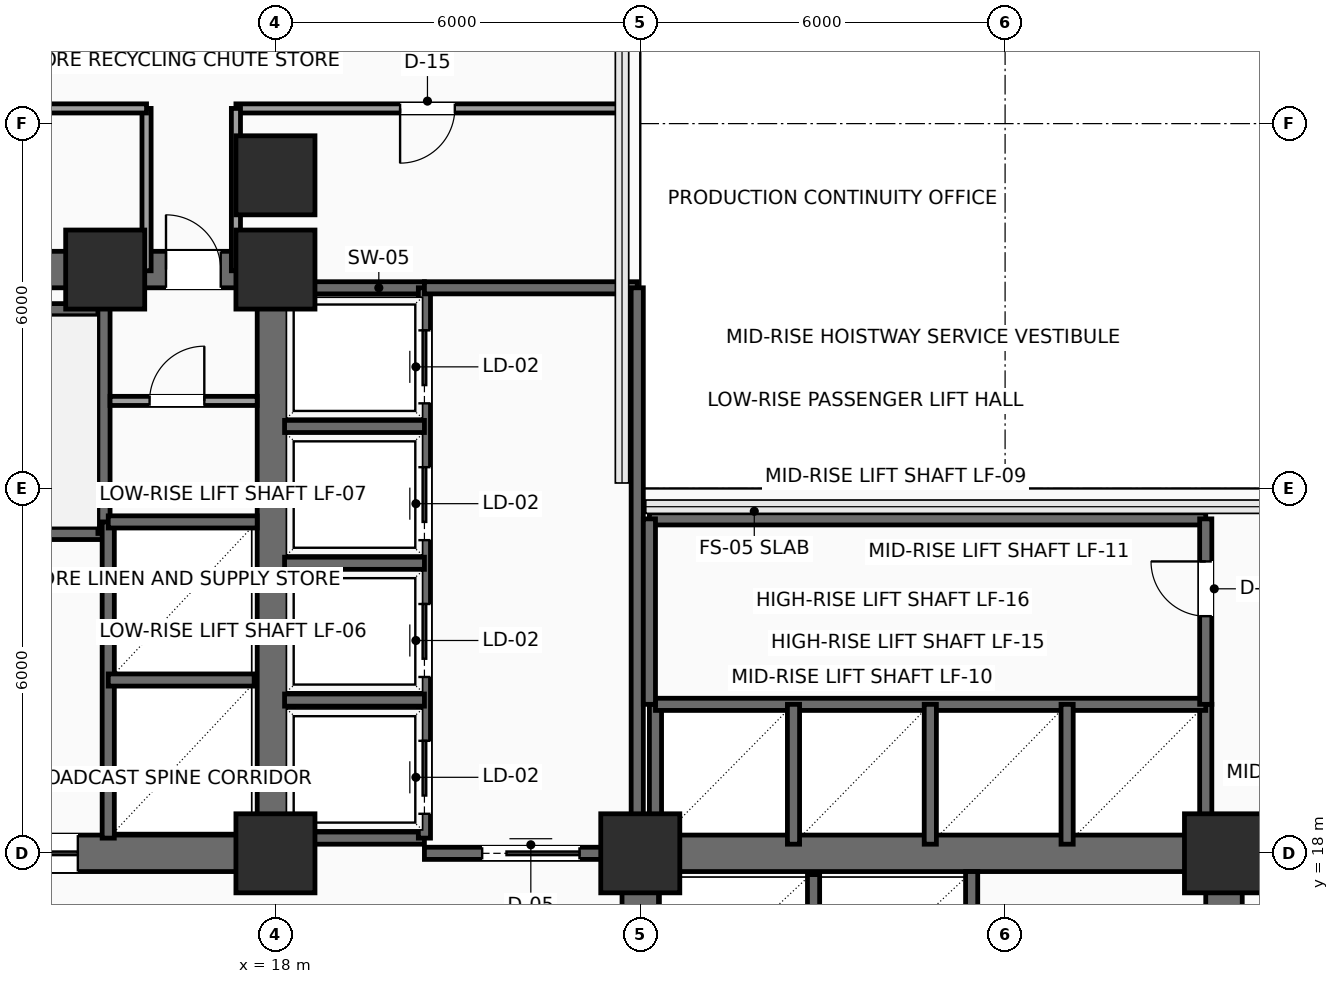
"""IFC4 building model, lengths in metres.
Left out: names, types, materials, properties, quantities, classifications, styles, units other than length and angle.
Written with IfcOpenShell. Run it as: python <this file> out.ifc"""

import sys

from ifc_helpers import new_model, si_unit, direction, frame, frame_2d, origin, origin_2d, place, context, subcontext, project, spatial, rectangle, extrude, element, fill, save


model = new_model("IFC4")
c1 = context("Model", 3, precision=1e-05, world=origin(), true_north=direction((0.0, 1.0)))
c2 = subcontext(c1, "Body", "Model", "MODEL_VIEW")
j1 = project(units=[si_unit("LENGTHUNIT", "METRE"), si_unit("PLANEANGLEUNIT", "RADIAN")], contexts=[c1])
p1 = place(None, origin())
s1 = spatial("IfcSite", under=j1, at=p1, CompositionType="ELEMENT")
p2 = place(p1, origin())
s2 = spatial("IfcBuilding", under=s1, at=p2, CompositionType="ELEMENT")
p3 = place(p2, frame((0.0, 0.0, 32.4)))
s3 = spatial("IfcBuildingStorey", under=s2, at=p3, CompositionType="ELEMENT", Elevation=32.4)
for number, where, z_axis, x_axis in (
    (1, (18.0, 18.0, 0.0), (0.0, 0.0, 1.0), (1.0, 0.0, 0.0)),
    (2, (15.2, 27.6, 0.0), (0.0, 0.0, 1.0), (1.0, 0.0, 0.0)),
    (3, (18.0, 27.6, 0.0), (0.0, 0.0, 1.0), (1.0, 0.0, 0.0)),
    (4, (24.0, 18.0, 0.0), (0.0, 0.0, 1.0), (1.0, 0.0, 0.0)),
    (5, (33.6, 18.0, 0.0), (0.0, 0.0, 1.0), (1.0, 0.0, 0.0)),
    (6, (18.0, 29.15, 0.0), (0.0, 0.0, 1.0), (1.0, 0.0, 0.0)),
):
    element("IfcColumn", number, at=place(p3, frame(where, z_axis=z_axis, x_axis=x_axis)), inside=s3, PredefinedType="COLUMN", context=c2, shape_type="SweptSolid", body=[
        extrude(rectangle(XDim=1.3, YDim=1.3, at=origin_2d()), origin(), (0.0, 0.0, 1.0), 3.9),
    ])
p4 = place(p3, frame((6.0, 18.0, 0.0), z_axis=(0.0, 0.0, 1.0), x_axis=(1.0, 0.0, 0.0)))
e7 = element("IfcWall", 7, at=p4, inside=s3, PredefinedType="SHEAR", context=c2, shape_type="SweptSolid", body=[
    extrude(rectangle(XDim=12.0, YDim=0.6, at=frame_2d((6.0, 0.0))), origin(), (0.0, 0.0, 1.0), 3.65),
])
p5 = place(p4, frame((7.15, 0.0, 0.0)))
e8 = element("IfcOpeningElement", 8, at=p5, cuts=e7, PredefinedType="OPENING", context=c2, shape_type="SweptSolid", body=[
    extrude(rectangle(XDim=1.6, YDim=2.3, at=frame_2d((0.8, 1.15))), frame((0.0, 0.31, 0.0), z_axis=(0.0, -1.0, 0.0), x_axis=(1.0, 0.0, 0.0)), (0.0, 0.0, 1.0), 0.62),
])
p6 = place(p3, frame((6.0, 27.6, 0.0), z_axis=(0.0, 0.0, 1.0), x_axis=(1.0, 0.0, 0.0)))
e9 = element("IfcWall", 9, at=p6, inside=s3, PredefinedType="SHEAR", context=c2, shape_type="SweptSolid", body=[
    extrude(rectangle(XDim=12.0, YDim=0.6, at=frame_2d((6.0, 0.0))), origin(), (0.0, 0.0, 1.0), 3.65),
])
p7 = place(p6, frame((10.2, 0.0, 0.0)))
e10 = element("IfcOpeningElement", 10, at=p7, cuts=e9, PredefinedType="OPENING", context=c2, shape_type="SweptSolid", body=[
    extrude(rectangle(XDim=0.9, YDim=2.15, at=frame_2d((0.45, 1.075))), frame((0.0, 0.31, 0.0), z_axis=(0.0, -1.0, 0.0), x_axis=(1.0, 0.0, 0.0)), (0.0, 0.0, 1.0), 0.62),
])
for number, where, z_axis, x_axis in (
    (11, (18.0, 18.0, 0.0), (0.0, 0.0, 1.0), (0.0, 1.0, 0.0)),
    (12, (24.0, 18.0, 0.0), (0.0, 0.0, 1.0), (1.0, 0.0, 0.0)),
):
    element("IfcWall", number, at=place(p3, frame(where, z_axis=z_axis, x_axis=x_axis)), inside=s3, PredefinedType="SHEAR", context=c2, shape_type="SweptSolid", body=[
        extrude(rectangle(XDim=9.6, YDim=0.6, at=frame_2d((4.8, 0.0))), origin(), (0.0, 0.0, 1.0), 3.65),
    ])
p8 = place(p3, frame((24.0, 6.0, 0.0), z_axis=(0.0, 0.0, 1.0), x_axis=(0.0, 1.0, 0.0)))
e13 = element("IfcWall", 13, at=p8, inside=s3, PredefinedType="SHEAR", context=c2, shape_type="SweptSolid", body=[
    extrude(rectangle(XDim=12.0, YDim=0.6, at=frame_2d((6.0, 0.0))), origin(), (0.0, 0.0, 1.0), 3.65),
])
p9 = place(p8, frame((7.15, 0.0, 0.0)))
e14 = element("IfcOpeningElement", 14, at=p9, cuts=e13, PredefinedType="OPENING", context=c2, shape_type="SweptSolid", body=[
    extrude(rectangle(XDim=1.6, YDim=2.3, at=frame_2d((0.8, 1.15))), frame((0.0, 0.31, 0.0), z_axis=(0.0, -1.0, 0.0), x_axis=(1.0, 0.0, 0.0)), (0.0, 0.0, 1.0), 0.62),
])
p10 = place(p3, frame((33.6, 6.0, 0.0), z_axis=(0.0, 0.0, 1.0), x_axis=(0.0, 1.0, 0.0)))
e15 = element("IfcWall", 15, at=p10, inside=s3, PredefinedType="SHEAR", context=c2, shape_type="SweptSolid", body=[
    extrude(rectangle(XDim=12.0, YDim=0.6, at=frame_2d((6.0, 0.0))), origin(), (0.0, 0.0, 1.0), 3.65),
])
p11 = place(p10, frame((10.2, 0.0, 0.0)))
e16 = element("IfcOpeningElement", 16, at=p11, cuts=e15, PredefinedType="OPENING", context=c2, shape_type="SweptSolid", body=[
    extrude(rectangle(XDim=0.9, YDim=2.15, at=frame_2d((0.45, 1.075))), frame((0.0, 0.31, 0.0), z_axis=(0.0, -1.0, 0.0), x_axis=(1.0, 0.0, 0.0)), (0.0, 0.0, 1.0), 0.62),
])
p12 = place(p3, frame((6.3, 23.26, 0.0), z_axis=(0.0, 0.0, 1.0), x_axis=(1.0, 0.0, 0.0)))
e17 = element("IfcWall", 17, at=p12, inside=s3, PredefinedType="SHEAR", context=c2, shape_type="SweptSolid", body=[
    extrude(rectangle(XDim=8.88, YDim=0.2, at=frame_2d((4.44, 0.0))), origin(), (0.0, 0.0, 1.0), 3.65),
])
p13 = place(p12, frame((0.35, 0.0, 0.0)))
e18 = element("IfcOpeningElement", 18, at=p13, cuts=e17, PredefinedType="OPENING", context=c2, shape_type="SweptSolid", body=[
    extrude(rectangle(XDim=1.1, YDim=2.2, at=frame_2d((0.55, 1.1))), frame((0.0, 0.11, 0.0), z_axis=(0.0, -1.0, 0.0), x_axis=(1.0, 0.0, 0.0)), (0.0, 0.0, 1.0), 0.22),
])
p14 = place(p3, frame((6.3, 26.94, 0.0), z_axis=(0.0, 0.0, 1.0), x_axis=(1.0, 0.0, 0.0)))
e19 = element("IfcWall", 19, at=p14, inside=s3, PredefinedType="SHEAR", context=c2, shape_type="SweptSolid", body=[
    extrude(rectangle(XDim=8.88, YDim=0.2, at=frame_2d((4.44, 0.0))), origin(), (0.0, 0.0, 1.0), 3.65),
])
p15 = place(p3, frame((15.18, 23.26, 0.0), z_axis=(0.0, 0.0, 1.0), x_axis=(0.0, 1.0, 0.0)))
e20 = element("IfcWall", 20, at=p15, inside=s3, PredefinedType="SHEAR", context=c2, shape_type="SweptSolid", body=[
    extrude(rectangle(XDim=4.04, YDim=0.2, at=frame_2d((2.02, 0.0))), origin(), (0.0, 0.0, 1.0), 3.65),
])
p16 = place(p3, frame((15.25, 18.25, 0.0), z_axis=(0.0, 0.0, 1.0), x_axis=(0.0, 1.0, 0.0)))
e21 = element("IfcWall", 21, at=p16, inside=s3, PredefinedType="SHEAR", context=c2, shape_type="SweptSolid", body=[
    extrude(rectangle(XDim=5.2, YDim=0.2, at=frame_2d((2.6, 0.0))), origin(), (0.0, 0.0, 1.0), 3.65),
])
p17 = place(p3, frame((15.25, 20.85, 0.0), z_axis=(0.0, 0.0, 1.0), x_axis=(1.0, 0.0, 0.0)))
e22 = element("IfcWall", 22, at=p17, inside=s3, PredefinedType="SHEAR", context=c2, shape_type="SweptSolid", body=[
    extrude(rectangle(XDim=2.4, YDim=0.2, at=frame_2d((1.2, 0.0))), origin(), (0.0, 0.0, 1.0), 3.65),
])
p18 = place(p3, frame((15.25, 23.45, 0.0), z_axis=(0.0, 0.0, 1.0), x_axis=(1.0, 0.0, 0.0)))
e23 = element("IfcWall", 23, at=p18, inside=s3, PredefinedType="SHEAR", context=c2, shape_type="SweptSolid", body=[
    extrude(rectangle(XDim=2.45, YDim=0.2, at=frame_2d((1.225, 0.0))), origin(), (0.0, 0.0, 1.0), 3.65),
])
p19 = place(p3, frame((26.85, 15.25, 0.0), z_axis=(0.0, 0.0, 1.0), x_axis=(0.0, 1.0, 0.0)))
e24 = element("IfcWall", 24, at=p19, inside=s3, PredefinedType="SHEAR", context=c2, shape_type="SweptSolid", body=[
    extrude(rectangle(XDim=2.4, YDim=0.2, at=frame_2d((1.2, 0.0))), origin(), (0.0, 0.0, 1.0), 3.65),
])
p20 = place(p3, frame((29.45, 15.25, 0.0), z_axis=(0.0, 0.0, 1.0), x_axis=(0.0, 1.0, 0.0)))
e25 = element("IfcWall", 25, at=p20, inside=s3, PredefinedType="SHEAR", context=c2, shape_type="SweptSolid", body=[
    extrude(rectangle(XDim=2.45, YDim=0.2, at=frame_2d((1.225, 0.0))), origin(), (0.0, 0.0, 1.0), 3.65),
])
p21 = place(p3, frame((15.28, 25.44, 0.0), z_axis=(0.0, 0.0, 1.0), x_axis=(1.0, 0.0, 0.0)))
e26 = element("IfcWall", 26, at=p21, inside=s3, PredefinedType="PARTITIONING", context=c2, shape_type="SweptSolid", body=[
    extrude(rectangle(XDim=2.42, YDim=0.15, at=frame_2d((1.21, 0.0))), origin(), (0.0, 0.0, 1.0), 3.65),
])
p22 = place(p21, frame((0.65, 0.0, 0.0)))
e27 = element("IfcOpeningElement", 27, at=p22, cuts=e26, PredefinedType="OPENING", context=c2, shape_type="SweptSolid", body=[
    extrude(rectangle(XDim=0.9, YDim=2.15, at=frame_2d((0.45, 1.075))), frame((0.0, 0.085, 0.0), z_axis=(0.0, -1.0, 0.0), x_axis=(1.0, 0.0, 0.0)), (0.0, 0.0, 1.0), 0.17),
])
for number, where, z_axis, x_axis in (
    (28, (18.1, 27.3, 0.0), (0.0, 0.0, 1.0), (1.0, 0.0, 0.0)),
    (29, (18.1, 18.25, 0.0), (0.0, 0.0, 1.0), (1.0, 0.0, 0.0)),
):
    element("IfcWall", number, at=place(p3, frame(where, z_axis=z_axis, x_axis=x_axis)), inside=s3, PredefinedType="SHEAR", context=c2, shape_type="SweptSolid", body=[
        extrude(rectangle(XDim=2.35, YDim=0.2, at=frame_2d((1.175, 0.0))), origin(), (0.0, 0.0, 1.0), 3.65),
    ])
p23 = place(p3, frame((20.45, 18.25, 0.0), z_axis=(0.0, 0.0, 1.0), x_axis=(0.0, 1.0, 0.0)))
e30 = element("IfcWall", 30, at=p23, inside=s3, PredefinedType="SHEAR", context=c2, shape_type="SweptSolid", body=[
    extrude(rectangle(XDim=9.05, YDim=0.2, at=frame_2d((4.525, 0.0))), origin(), (0.0, 0.0, 1.0), 3.65),
])
p24 = place(p23, frame((0.4, 0.0, 0.0)))
e31 = element("IfcOpeningElement", 31, at=p24, cuts=e30, PredefinedType="OPENING", context=c2, shape_type="SweptSolid", body=[
    extrude(rectangle(XDim=1.2, YDim=2.2, at=frame_2d((0.6, 1.1))), frame((0.0, 0.11, 0.0), z_axis=(0.0, -1.0, 0.0), x_axis=(1.0, 0.0, 0.0)), (0.0, 0.0, 1.0), 0.22),
])
p25 = place(p23, frame((2.65, 0.0, 0.0)))
e32 = element("IfcOpeningElement", 32, at=p25, cuts=e30, PredefinedType="OPENING", context=c2, shape_type="SweptSolid", body=[
    extrude(rectangle(XDim=1.2, YDim=2.2, at=frame_2d((0.6, 1.1))), frame((0.0, 0.11, 0.0), z_axis=(0.0, -1.0, 0.0), x_axis=(1.0, 0.0, 0.0)), (0.0, 0.0, 1.0), 0.22),
])
p26 = place(p23, frame((4.9, 0.0, 0.0)))
e33 = element("IfcOpeningElement", 33, at=p26, cuts=e30, PredefinedType="OPENING", context=c2, shape_type="SweptSolid", body=[
    extrude(rectangle(XDim=1.2, YDim=2.2, at=frame_2d((0.6, 1.1))), frame((0.0, 0.11, 0.0), z_axis=(0.0, -1.0, 0.0), x_axis=(1.0, 0.0, 0.0)), (0.0, 0.0, 1.0), 0.22),
])
p27 = place(p23, frame((7.15, 0.0, 0.0)))
e34 = element("IfcOpeningElement", 34, at=p27, cuts=e30, PredefinedType="OPENING", context=c2, shape_type="SweptSolid", body=[
    extrude(rectangle(XDim=1.2, YDim=2.2, at=frame_2d((0.6, 1.1))), frame((0.0, 0.11, 0.0), z_axis=(0.0, -1.0, 0.0), x_axis=(1.0, 0.0, 0.0)), (0.0, 0.0, 1.0), 0.22),
])
for number, where, z_axis, x_axis in (
    (35, (18.15, 20.52, 0.0), (0.0, 0.0, 1.0), (1.0, 0.0, 0.0)),
    (36, (18.15, 22.77, 0.0), (0.0, 0.0, 1.0), (1.0, 0.0, 0.0)),
    (37, (18.15, 25.02, 0.0), (0.0, 0.0, 1.0), (1.0, 0.0, 0.0)),
):
    element("IfcWall", number, at=place(p3, frame(where, z_axis=z_axis, x_axis=x_axis)), inside=s3, PredefinedType="SHEAR", context=c2, shape_type="SweptSolid", body=[
        extrude(rectangle(XDim=2.3, YDim=0.2, at=frame_2d((1.15, 0.0))), origin(), (0.0, 0.0, 1.0), 3.65),
    ])
p28 = place(p3, frame((20.45, 18.0, 0.0), z_axis=(0.0, 0.0, 1.0), x_axis=(1.0, 0.0, 0.0)))
e38 = element("IfcWall", 38, at=p28, inside=s3, PredefinedType="SHEAR", context=c2, shape_type="SweptSolid", body=[
    extrude(rectangle(XDim=3.5, YDim=0.2, at=frame_2d((1.75, 0.0))), origin(), (0.0, 0.0, 1.0), 3.65),
])
p29 = place(p28, frame((0.95, 0.0, 0.0)))
e39 = element("IfcOpeningElement", 39, at=p29, cuts=e38, PredefinedType="OPENING", context=c2, shape_type="SweptSolid", body=[
    extrude(rectangle(XDim=1.6, YDim=2.3, at=frame_2d((0.8, 1.15))), frame((0.0, 0.11, 0.0), z_axis=(0.0, -1.0, 0.0), x_axis=(1.0, 0.0, 0.0)), (0.0, 0.0, 1.0), 0.22),
])
p30 = place(p3, frame((20.45, 27.3, 0.0), z_axis=(0.0, 0.0, 1.0), x_axis=(1.0, 0.0, 0.0)))
e40 = element("IfcWall", 40, at=p30, inside=s3, PredefinedType="SHEAR", context=c2, shape_type="SweptSolid", body=[
    extrude(rectangle(XDim=3.5, YDim=0.2, at=frame_2d((1.75, 0.0))), origin(), (0.0, 0.0, 1.0), 3.65),
])
p31 = place(p3, frame((23.95, 18.0, 0.0), z_axis=(0.0, 0.0, 1.0), x_axis=(0.0, 1.0, 0.0)))
e41 = element("IfcWall", 41, at=p31, inside=s3, PredefinedType="SHEAR", context=c2, shape_type="SweptSolid", body=[
    extrude(rectangle(XDim=9.3, YDim=0.2, at=frame_2d((4.65, 0.0))), origin(), (0.0, 0.0, 1.0), 3.65),
])
for number, where, z_axis, x_axis in (
    (42, (33.3, 18.1, 0.0), (0.0, 0.0, 1.0), (0.0, 1.0, 0.0)),
    (43, (24.25, 18.1, 0.0), (0.0, 0.0, 1.0), (0.0, 1.0, 0.0)),
):
    element("IfcWall", number, at=place(p3, frame(where, z_axis=z_axis, x_axis=x_axis)), inside=s3, PredefinedType="SHEAR", context=c2, shape_type="SweptSolid", body=[
        extrude(rectangle(XDim=2.35, YDim=0.2, at=frame_2d((1.175, 0.0))), origin(), (0.0, 0.0, 1.0), 3.65),
    ])
p32 = place(p3, frame((24.25, 20.45, 0.0), z_axis=(0.0, 0.0, 1.0), x_axis=(1.0, 0.0, 0.0)))
e44 = element("IfcWall", 44, at=p32, inside=s3, PredefinedType="SHEAR", context=c2, shape_type="SweptSolid", body=[
    extrude(rectangle(XDim=9.05, YDim=0.2, at=frame_2d((4.525, 0.0))), origin(), (0.0, 0.0, 1.0), 3.65),
])
for number, where, z_axis, x_axis in (
    (45, (26.52, 18.15, 0.0), (0.0, 0.0, 1.0), (0.0, 1.0, 0.0)),
    (46, (28.77, 18.15, 0.0), (0.0, 0.0, 1.0), (0.0, 1.0, 0.0)),
    (47, (31.02, 18.15, 0.0), (0.0, 0.0, 1.0), (0.0, 1.0, 0.0)),
):
    element("IfcWall", number, at=place(p3, frame(where, z_axis=z_axis, x_axis=x_axis)), inside=s3, PredefinedType="SHEAR", context=c2, shape_type="SweptSolid", body=[
        extrude(rectangle(XDim=2.3, YDim=0.2, at=frame_2d((1.15, 0.0))), origin(), (0.0, 0.0, 1.0), 3.65),
    ])
p33 = place(p3, frame((24.15, 23.5, 0.0), z_axis=(0.0, 0.0, 1.0), x_axis=(1.0, 0.0, 0.0)))
e48 = element("IfcWall", 48, at=p33, inside=s3, PredefinedType="SHEAR", context=c2, shape_type="SweptSolid", body=[
    extrude(rectangle(XDim=9.15, YDim=0.2, at=frame_2d((4.575, 0.0))), origin(), (0.0, 0.0, 1.0), 3.65),
])
p34 = place(p3, frame((33.3, 20.45, 0.0), z_axis=(0.0, 0.0, 1.0), x_axis=(0.0, 1.0, 0.0)))
e49 = element("IfcWall", 49, at=p34, inside=s3, PredefinedType="SHEAR", context=c2, shape_type="SweptSolid", body=[
    extrude(rectangle(XDim=3.05, YDim=0.2, at=frame_2d((1.525, 0.0))), origin(), (0.0, 0.0, 1.0), 3.65),
])
p35 = place(p34, frame((1.45, 0.0, 0.0)))
e50 = element("IfcOpeningElement", 50, at=p35, cuts=e49, PredefinedType="OPENING", context=c2, shape_type="SweptSolid", body=[
    extrude(rectangle(XDim=0.9, YDim=2.15, at=frame_2d((0.45, 1.075))), frame((0.0, 0.11, 0.0), z_axis=(0.0, -1.0, 0.0), x_axis=(1.0, 0.0, 0.0)), (0.0, 0.0, 1.0), 0.22),
])
p36 = place(p3, frame((24.15, 20.45, 0.0), z_axis=(0.0, 0.0, 1.0), x_axis=(0.0, 1.0, 0.0)))
e51 = element("IfcWall", 51, at=p36, inside=s3, PredefinedType="SHEAR", context=c2, shape_type="SweptSolid", body=[
    extrude(rectangle(XDim=3.05, YDim=0.2, at=frame_2d((1.525, 0.0))), origin(), (0.0, 0.0, 1.0), 3.65),
])
p37 = place(p3, frame((23.7, 30.25, 0.0), z_axis=(0.0, 0.0, 1.0), x_axis=(-1.0, 0.0, 0.0)))
e52 = element("IfcWall", 52, at=p37, inside=s3, PredefinedType="PARTITIONING", context=c2, shape_type="SweptSolid", body=[
    extrude(rectangle(XDim=6.35, YDim=0.15, at=frame_2d((3.175, 0.0))), origin(), (0.0, 0.0, 1.0), 3.65),
])
p38 = place(p37, frame((2.75, 0.0, 0.0)))
e53 = element("IfcOpeningElement", 53, at=p38, cuts=e52, PredefinedType="OPENING", context=c2, shape_type="SweptSolid", body=[
    extrude(rectangle(XDim=0.9, YDim=2.1, at=frame_2d((0.45, 1.05))), frame((0.0, 0.085, 0.0), z_axis=(0.0, -1.0, 0.0), x_axis=(1.0, 0.0, 0.0)), (0.0, 0.0, 1.0), 0.17),
])
for number, where, z_axis, x_axis in (
    (54, (17.35, 30.25, 0.0), (0.0, 0.0, 1.0), (0.0, -1.0, 0.0)),
    (55, (15.88, 27.58, 0.0), (0.0, 0.0, 1.0), (0.0, 1.0, 0.0)),
):
    element("IfcWall", number, at=place(p3, frame(where, z_axis=z_axis, x_axis=x_axis)), inside=s3, PredefinedType="PARTITIONING", context=c2, shape_type="SweptSolid", body=[
        extrude(rectangle(XDim=2.67, YDim=0.15, at=frame_2d((1.335, 0.0))), origin(), (0.0, 0.0, 1.0), 3.65),
    ])
p39 = place(p3, frame((15.88, 30.25, 0.0), z_axis=(0.0, 0.0, 1.0), x_axis=(-1.0, 0.0, 0.0)))
e56 = element("IfcWall", 56, at=p39, inside=s3, PredefinedType="PARTITIONING", context=c2, shape_type="SweptSolid", body=[
    extrude(rectangle(XDim=10.63, YDim=0.15, at=frame_2d((5.315, 0.0))), origin(), (0.0, 0.0, 1.0), 3.65),
])
p40 = place(p39, frame((6.13, 0.0, 0.0)))
e57 = element("IfcOpeningElement", 57, at=p40, cuts=e56, PredefinedType="OPENING", context=c2, shape_type="SweptSolid", body=[
    extrude(rectangle(XDim=0.9, YDim=2.1, at=frame_2d((0.45, 1.05))), frame((0.0, 0.085, 0.0), z_axis=(0.0, -1.0, 0.0), x_axis=(1.0, 0.0, 0.0)), (0.0, 0.0, 1.0), 0.17),
])
p41 = place(p5, origin())
e58 = element("IfcDoor", 58, at=p41, inside=s3, OperationType="DOUBLE_DOOR_SLIDING", PredefinedType="DOOR", context=c2, shape_type="SweptSolid", body=[
    extrude(rectangle(XDim=1.6, YDim=2.3, at=frame_2d((0.8, 1.15))), frame((0.0, 0.025, 0.0), z_axis=(0.0, -1.0, 0.0), x_axis=(1.0, 0.0, 0.0)), (0.0, 0.0, 1.0), 0.05),
])
fill(e8, e58)
p42 = place(p7, origin())
e59 = element("IfcDoor", 59, at=p42, inside=s3, OperationType="SINGLE_SWING_LEFT", PredefinedType="DOOR", context=c2, shape_type="SweptSolid", body=[
    extrude(rectangle(XDim=0.9, YDim=2.15, at=frame_2d((0.45, 1.075))), frame((0.0, 0.025, 0.0), z_axis=(0.0, -1.0, 0.0), x_axis=(1.0, 0.0, 0.0)), (0.0, 0.0, 1.0), 0.05),
])
fill(e10, e59)
p43 = place(p22, origin())
e60 = element("IfcDoor", 60, at=p43, inside=s3, OperationType="SINGLE_SWING_RIGHT", PredefinedType="DOOR", context=c2, shape_type="SweptSolid", body=[
    extrude(rectangle(XDim=0.9, YDim=2.15, at=frame_2d((0.45, 1.075))), frame((0.0, 0.025, 0.0), z_axis=(0.0, -1.0, 0.0), x_axis=(1.0, 0.0, 0.0)), (0.0, 0.0, 1.0), 0.05),
])
fill(e27, e60)
p44 = place(p24, origin())
e61 = element("IfcDoor", 61, at=p44, inside=s3, OperationType="SLIDING_TO_RIGHT", PredefinedType="DOOR", context=c2, shape_type="SweptSolid", body=[
    extrude(rectangle(XDim=1.2, YDim=2.2, at=frame_2d((0.6, 1.1))), frame((0.0, 0.025, 0.0), z_axis=(0.0, -1.0, 0.0), x_axis=(1.0, 0.0, 0.0)), (0.0, 0.0, 1.0), 0.05),
])
fill(e31, e61)
p45 = place(p25, origin())
e62 = element("IfcDoor", 62, at=p45, inside=s3, OperationType="SLIDING_TO_RIGHT", PredefinedType="DOOR", context=c2, shape_type="SweptSolid", body=[
    extrude(rectangle(XDim=1.2, YDim=2.2, at=frame_2d((0.6, 1.1))), frame((0.0, 0.025, 0.0), z_axis=(0.0, -1.0, 0.0), x_axis=(1.0, 0.0, 0.0)), (0.0, 0.0, 1.0), 0.05),
])
fill(e32, e62)
p46 = place(p26, origin())
e63 = element("IfcDoor", 63, at=p46, inside=s3, OperationType="SLIDING_TO_RIGHT", PredefinedType="DOOR", context=c2, shape_type="SweptSolid", body=[
    extrude(rectangle(XDim=1.2, YDim=2.2, at=frame_2d((0.6, 1.1))), frame((0.0, 0.025, 0.0), z_axis=(0.0, -1.0, 0.0), x_axis=(1.0, 0.0, 0.0)), (0.0, 0.0, 1.0), 0.05),
])
fill(e33, e63)
p47 = place(p27, origin())
e64 = element("IfcDoor", 64, at=p47, inside=s3, OperationType="SLIDING_TO_RIGHT", PredefinedType="DOOR", context=c2, shape_type="SweptSolid", body=[
    extrude(rectangle(XDim=1.2, YDim=2.2, at=frame_2d((0.6, 1.1))), frame((0.0, 0.025, 0.0), z_axis=(0.0, -1.0, 0.0), x_axis=(1.0, 0.0, 0.0)), (0.0, 0.0, 1.0), 0.05),
])
fill(e34, e64)
p48 = place(p29, origin())
e65 = element("IfcDoor", 65, at=p48, inside=s3, OperationType="DOUBLE_DOOR_SLIDING", PredefinedType="DOOR", context=c2, shape_type="SweptSolid", body=[
    extrude(rectangle(XDim=1.6, YDim=2.3, at=frame_2d((0.8, 1.15))), frame((0.0, 0.025, 0.0), z_axis=(0.0, -1.0, 0.0), x_axis=(1.0, 0.0, 0.0)), (0.0, 0.0, 1.0), 0.05),
])
fill(e39, e65)
p49 = place(p35, origin())
e66 = element("IfcDoor", 66, at=p49, inside=s3, OperationType="SINGLE_SWING_RIGHT", PredefinedType="DOOR", context=c2, shape_type="SweptSolid", body=[
    extrude(rectangle(XDim=0.9, YDim=2.15, at=frame_2d((0.45, 1.075))), frame((0.0, 0.025, 0.0), z_axis=(0.0, -1.0, 0.0), x_axis=(1.0, 0.0, 0.0)), (0.0, 0.0, 1.0), 0.05),
])
fill(e50, e66)
p50 = place(p38, origin())
e67 = element("IfcDoor", 67, at=p50, inside=s3, OperationType="SINGLE_SWING_RIGHT", PredefinedType="DOOR", context=c2, shape_type="SweptSolid", body=[
    extrude(rectangle(XDim=0.9, YDim=2.1, at=frame_2d((0.45, 1.05))), frame((0.0, 0.025, 0.0), z_axis=(0.0, -1.0, 0.0), x_axis=(1.0, 0.0, 0.0)), (0.0, 0.0, 1.0), 0.05),
])
fill(e53, e67)
save(model, sys.argv[1])
